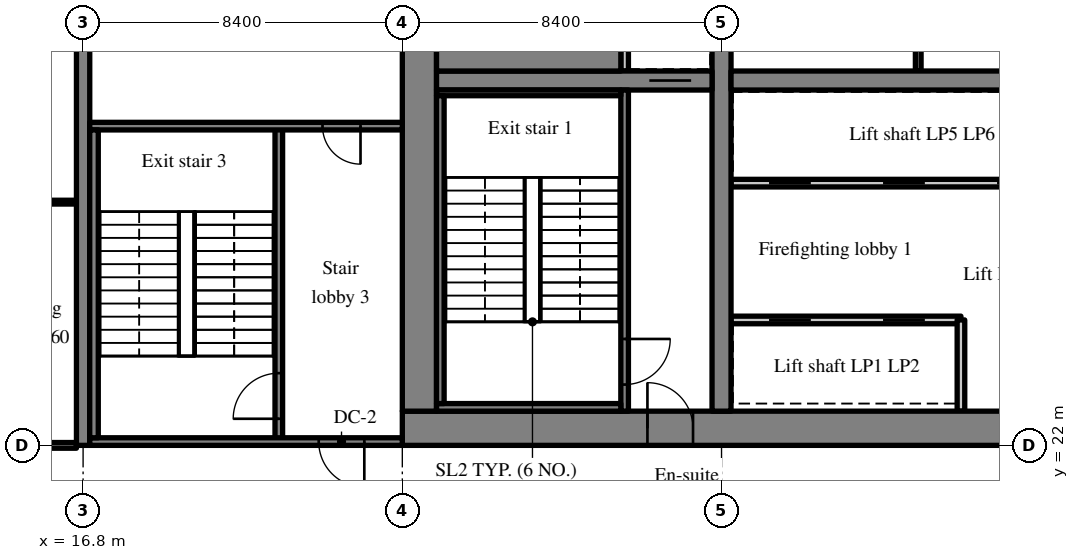
"""IFC4 building model, lengths in metres.
Left out: names, types, materials, properties, quantities, classifications, styles, units other than length and angle.
Written with IfcOpenShell. Run it as: python <this file> out.ifc"""

import sys

from ifc_helpers import new_model, si_unit, direction, frame, frame_2d, origin, place, context, subcontext, project, spatial, rectangle, extrude, source, transform, mapped, element, fill, save


model = new_model("IFC4")
c1 = context("Model", 3, precision=1e-05, world=origin(), true_north=direction((0.0, 1.0)))
c2 = subcontext(c1, "Body", "Model", "MODEL_VIEW")
j1 = project(units=[si_unit("LENGTHUNIT", "METRE"), si_unit("PLANEANGLEUNIT", "RADIAN")], contexts=[c1])
p1 = place(None, origin())
s1 = spatial("IfcSite", under=j1, at=p1, CompositionType="ELEMENT")
p2 = place(p1, origin())
s2 = spatial("IfcBuilding", under=s1, at=p2, CompositionType="ELEMENT")
p3 = place(p2, frame((0.0, 0.0, 137.0)))
s3 = spatial("IfcBuildingStorey", under=s2, at=p3, CompositionType="ELEMENT", Elevation=137.0)
m1 = source(origin(), c2, "Body", "SweptSolid", [
    extrude(rectangle(XDim=50.4, YDim=0.9, at=frame_2d((25.2, 0.0))), origin(), (0.0, 0.0, 1.0), 3.52),
])
p4 = place(p3, frame((25.2, 22.45, 0.0), z_axis=(0.0, 0.0, 1.0), x_axis=(1.0, 0.0, 0.0)))
e1 = element("IfcWall", 1, at=p4, inside=s3, PredefinedType="SHEAR", context=c2, shape_type="MappedRepresentation", body=[
    mapped(m1, transform((0.0, 0.0, 0.0), scale=1.0)),
])
m2 = source(origin(), c2, "Body", "SweptSolid", [
    extrude(rectangle(XDim=1.8, YDim=2.1, at=frame_2d((0.9, 1.05))), frame((0.0, 0.46, 0.0), z_axis=(0.0, -1.0, 0.0), x_axis=(1.0, 0.0, 0.0)), (0.0, 0.0, 1.0), 0.92),
])
p5 = place(p4, frame((15.9, 0.0, 0.0)))
e2 = element("IfcOpeningElement", 2, at=p5, cuts=e1, PredefinedType="OPENING", context=c2, shape_type="MappedRepresentation", body=[
    mapped(m2, transform((0.0, 0.0, 0.0), scale=1.0)),
])
m3 = source(origin(), c2, "Body", "SweptSolid", [
    extrude(rectangle(XDim=1.2, YDim=2.1, at=frame_2d((0.6, 1.05))), frame((0.0, 0.46, 0.0), z_axis=(0.0, -1.0, 0.0), x_axis=(1.0, 0.0, 0.0)), (0.0, 0.0, 1.0), 0.92),
])
p6 = place(p4, frame((26.975, 0.0, 0.0)))
e3 = element("IfcOpeningElement", 3, at=p6, cuts=e1, PredefinedType="OPENING", context=c2, shape_type="MappedRepresentation", body=[
    mapped(m3, transform((0.0, 0.0, 0.0), scale=1.0)),
])
m4 = source(origin(), c2, "Body", "SweptSolid", [
    extrude(rectangle(XDim=0.9, YDim=2.1, at=frame_2d((0.45, 1.05))), frame((0.0, 0.46, 0.0), z_axis=(0.0, -1.0, 0.0), x_axis=(1.0, 0.0, 0.0)), (0.0, 0.0, 1.0), 0.92),
])
p7 = place(p4, frame((34.5, 0.0, 0.0)))
e4 = element("IfcOpeningElement", 4, at=p7, cuts=e1, PredefinedType="OPENING", context=c2, shape_type="MappedRepresentation", body=[
    mapped(m4, transform((0.0, 0.0, 0.0), scale=1.0)),
])
p8 = place(p4, frame((31.5, 0.0, 0.0)))
e5 = element("IfcOpeningElement", 5, at=p8, cuts=e1, PredefinedType="OPENING", context=c2, shape_type="MappedRepresentation", body=[
    mapped(m4, transform((0.0, 0.0, 0.0), scale=1.0)),
])
p9 = place(p4, frame((39.788, 0.0, 0.0)))
e6 = element("IfcOpeningElement", 6, at=p9, cuts=e1, PredefinedType="OPENING", context=c2, shape_type="MappedRepresentation", body=[
    mapped(m4, transform((0.0, 0.0, 0.0), scale=1.0)),
])
p10 = place(p4, frame((36.762, 0.0, 0.0)))
e7 = element("IfcOpeningElement", 7, at=p10, cuts=e1, PredefinedType="OPENING", context=c2, shape_type="MappedRepresentation", body=[
    mapped(m4, transform((0.0, 0.0, 0.0), scale=1.0)),
])
p11 = place(p4, frame((6.45, 0.0, 0.0)))
e8 = element("IfcOpeningElement", 8, at=p11, cuts=e1, PredefinedType="OPENING", context=c2, shape_type="MappedRepresentation", body=[
    mapped(m3, transform((0.0, 0.0, 0.0), scale=1.0)),
])
p12 = place(p4, frame((47.775, 0.0, 0.0)))
e9 = element("IfcOpeningElement", 9, at=p12, cuts=e1, PredefinedType="OPENING", context=c2, shape_type="MappedRepresentation", body=[
    mapped(m3, transform((0.0, 0.0, 0.0), scale=1.0)),
])
m5 = source(origin(), c2, "Body", "SweptSolid", [
    extrude(rectangle(XDim=18.2, YDim=0.9, at=frame_2d((9.1, 0.0))), origin(), (0.0, 0.0, 1.0), 3.52),
])
p13 = place(p3, frame((25.65, 22.9, 0.0), z_axis=(0.0, 0.0, 1.0), x_axis=(0.0, 1.0, 0.0)))
e10 = element("IfcWall", 10, at=p13, inside=s3, PredefinedType="SHEAR", context=c2, shape_type="MappedRepresentation", body=[
    mapped(m5, transform((0.0, 0.0, 0.0), scale=1.0)),
])
m6 = source(origin(), c2, "Body", "SweptSolid", [
    extrude(rectangle(XDim=18.2, YDim=0.5, at=frame_2d((9.1, 0.0))), origin(), (0.0, 0.0, 1.0), 3.52),
])
p14 = place(p3, frame((33.6, 22.9, 0.0), z_axis=(0.0, 0.0, 1.0), x_axis=(0.0, 1.0, 0.0)))
e11 = element("IfcWall", 11, at=p14, inside=s3, PredefinedType="SHEAR", context=c2, shape_type="MappedRepresentation", body=[
    mapped(m6, transform((0.0, 0.0, 0.0), scale=1.0)),
])
m7 = source(origin(), c2, "Body", "SweptSolid", [
    extrude(rectangle(XDim=1.1, YDim=2.1, at=frame_2d((0.55, 1.05))), frame((0.0, 0.26, 0.0), z_axis=(0.0, -1.0, 0.0), x_axis=(1.0, 0.0, 0.0)), (0.0, 0.0, 1.0), 0.52),
])
p15 = place(p14, frame((12.55, 0.0, 0.0)))
e12 = element("IfcOpeningElement", 12, at=p15, cuts=e11, PredefinedType="OPENING", context=c2, shape_type="MappedRepresentation", body=[
    mapped(m7, transform((0.0, 0.0, 0.0), scale=1.0)),
])
m8 = source(origin(), c2, "Body", "SweptSolid", [
    extrude(rectangle(XDim=7.25, YDim=0.5, at=frame_2d((3.625, 0.0))), origin(), (0.0, 0.0, 1.0), 3.52),
])
p16 = place(p3, frame((26.1, 31.6, 0.0), z_axis=(0.0, 0.0, 1.0), x_axis=(1.0, 0.0, 0.0)))
e13 = element("IfcWall", 13, at=p16, inside=s3, PredefinedType="SHEAR", context=c2, shape_type="MappedRepresentation", body=[
    mapped(m8, transform((0.0, 0.0, 0.0), scale=1.0)),
])
p17 = place(p16, frame((5.6, 0.0, 0.0)))
e14 = element("IfcOpeningElement", 14, at=p17, cuts=e13, PredefinedType="OPENING", context=c2, shape_type="MappedRepresentation", body=[
    mapped(m7, transform((0.0, 0.0, 0.0), scale=1.0)),
])
m9 = source(origin(), c2, "Body", "SweptSolid", [
    extrude(rectangle(XDim=16.3, YDim=0.5, at=frame_2d((8.15, 0.0))), origin(), (0.0, 0.0, 1.0), 3.52),
])
p18 = place(p3, frame((33.85, 31.6, 0.0), z_axis=(0.0, 0.0, 1.0), x_axis=(1.0, 0.0, 0.0)))
e15 = element("IfcWall", 15, at=p18, inside=s3, PredefinedType="SHEAR", context=c2, shape_type="MappedRepresentation", body=[
    mapped(m9, transform((0.0, 0.0, 0.0), scale=1.0)),
])
m10 = source(origin(), c2, "Body", "SweptSolid", [
    extrude(rectangle(XDim=1.0, YDim=2.1, at=frame_2d((0.5, 1.05))), frame((0.0, 0.26, 0.0), z_axis=(0.0, -1.0, 0.0), x_axis=(1.0, 0.0, 0.0)), (0.0, 0.0, 1.0), 0.52),
])
p19 = place(p18, frame((14.725, 0.0, 0.0)))
e16 = element("IfcOpeningElement", 16, at=p19, cuts=e15, PredefinedType="OPENING", context=c2, shape_type="MappedRepresentation", body=[
    mapped(m10, transform((0.0, 0.0, 0.0), scale=1.0)),
])
m11 = source(origin(), c2, "Body", "SweptSolid", [
    extrude(rectangle(XDim=20.0, YDim=0.35, at=frame_2d((10.0, 0.0))), origin(), (0.0, 0.0, 1.0), 3.52),
])
p20 = place(p3, frame((16.8, 22.0, 0.0), z_axis=(0.0, 0.0, 1.0), x_axis=(0.0, 1.0, 0.0)))
e17 = element("IfcWall", 17, at=p20, inside=s3, PredefinedType="SHEAR", context=c2, shape_type="MappedRepresentation", body=[
    mapped(m11, transform((0.0, 0.0, 0.0), scale=1.0)),
])
m12 = source(origin(), c2, "Body", "SweptSolid", [
    extrude(rectangle(XDim=6.05, YDim=0.2, at=frame_2d((3.025, 0.0))), origin(), (0.0, 0.0, 1.0), 3.52),
])
p21 = place(p3, frame((33.85, 25.3, 0.0), z_axis=(0.0, 0.0, 1.0), x_axis=(1.0, 0.0, 0.0)))
e18 = element("IfcWall", 18, at=p21, inside=s3, PredefinedType="SOLIDWALL", context=c2, shape_type="MappedRepresentation", body=[
    mapped(m12, transform((0.0, 0.0, 0.0), scale=1.0)),
])
m13 = source(origin(), c2, "Body", "SweptSolid", [
    extrude(rectangle(XDim=1.1, YDim=2.1, at=frame_2d((0.55, 1.05))), frame((0.0, 0.11, 0.0), z_axis=(0.0, -1.0, 0.0), x_axis=(1.0, 0.0, 0.0)), (0.0, 0.0, 1.0), 0.22),
])
p22 = place(p21, frame((1.0, 0.0, 0.0)))
e19 = element("IfcOpeningElement", 19, at=p22, cuts=e18, PredefinedType="OPENING", context=c2, shape_type="MappedRepresentation", body=[
    mapped(m13, transform((0.0, 0.0, 0.0), scale=1.0)),
])
p23 = place(p21, frame((4.0, 0.0, 0.0)))
e20 = element("IfcOpeningElement", 20, at=p23, cuts=e18, PredefinedType="OPENING", context=c2, shape_type="MappedRepresentation", body=[
    mapped(m13, transform((0.0, 0.0, 0.0), scale=1.0)),
])
m14 = source(origin(), c2, "Body", "SweptSolid", [
    extrude(rectangle(XDim=12.05, YDim=0.2, at=frame_2d((6.025, 0.0))), origin(), (0.0, 0.0, 1.0), 3.52),
])
p24 = place(p3, frame((33.85, 28.9, 0.0), z_axis=(0.0, 0.0, 1.0), x_axis=(1.0, 0.0, 0.0)))
e21 = element("IfcWall", 21, at=p24, inside=s3, PredefinedType="SOLIDWALL", context=c2, shape_type="MappedRepresentation", body=[
    mapped(m14, transform((0.0, 0.0, 0.0), scale=1.0)),
])
p25 = place(p24, frame((1.0, 0.0, 0.0)))
e22 = element("IfcOpeningElement", 22, at=p25, cuts=e21, PredefinedType="OPENING", context=c2, shape_type="MappedRepresentation", body=[
    mapped(m13, transform((0.0, 0.0, 0.0), scale=1.0)),
])
p26 = place(p24, frame((4.0, 0.0, 0.0)))
e23 = element("IfcOpeningElement", 23, at=p26, cuts=e21, PredefinedType="OPENING", context=c2, shape_type="MappedRepresentation", body=[
    mapped(m13, transform((0.0, 0.0, 0.0), scale=1.0)),
])
p27 = place(p24, frame((7.0, 0.0, 0.0)))
e24 = element("IfcOpeningElement", 24, at=p27, cuts=e21, PredefinedType="OPENING", context=c2, shape_type="MappedRepresentation", body=[
    mapped(m13, transform((0.0, 0.0, 0.0), scale=1.0)),
])
p28 = place(p24, frame((10.0, 0.0, 0.0)))
e25 = element("IfcOpeningElement", 25, at=p28, cuts=e21, PredefinedType="OPENING", context=c2, shape_type="MappedRepresentation", body=[
    mapped(m13, transform((0.0, 0.0, 0.0), scale=1.0)),
])
m15 = source(origin(), c2, "Body", "SweptSolid", [
    extrude(rectangle(XDim=2.4, YDim=0.2, at=frame_2d((1.2, 0.0))), origin(), (0.0, 0.0, 1.0), 3.52),
])
p29 = place(p3, frame((39.9, 22.9, 0.0), z_axis=(0.0, 0.0, 1.0), x_axis=(0.0, 1.0, 0.0)))
e26 = element("IfcWall", 26, at=p29, inside=s3, PredefinedType="SOLIDWALL", context=c2, shape_type="MappedRepresentation", body=[
    mapped(m15, transform((0.0, 0.0, 0.0), scale=1.0)),
])
m16 = source(origin(), c2, "Body", "SweptSolid", [
    extrude(rectangle(XDim=3.15, YDim=0.15, at=frame_2d((1.575, 0.0))), origin(), (0.0, 0.0, 1.0), 3.52),
])
p30 = place(p3, frame((38.776, 31.85, 0.0), z_axis=(0.0, 0.0, 1.0), x_axis=(0.0, 1.0, 0.0)))
e27 = element("IfcWall", 27, at=p30, inside=s3, PredefinedType="PARTITIONING", context=c2, shape_type="MappedRepresentation", body=[
    mapped(m16, transform((0.0, 0.0, 0.0), scale=1.0)),
])
m17 = source(origin(), c2, "Body", "SweptSolid", [
    extrude(rectangle(XDim=8.45, YDim=0.2, at=frame_2d((4.225, 0.0))), origin(), (0.0, 0.0, 1.0), 3.52),
])
p31 = place(p3, frame((31.05, 22.9, 0.0), z_axis=(0.0, 0.0, 1.0), x_axis=(0.0, 1.0, 0.0)))
e28 = element("IfcWall", 28, at=p31, inside=s3, PredefinedType="SOLIDWALL", context=c2, shape_type="MappedRepresentation", body=[
    mapped(m17, transform((0.0, 0.0, 0.0), scale=1.0)),
])
m18 = source(origin(), c2, "Body", "SweptSolid", [
    extrude(rectangle(XDim=1.2, YDim=2.1, at=frame_2d((0.6, 1.05))), frame((0.0, 0.11, 0.0), z_axis=(0.0, -1.0, 0.0), x_axis=(1.0, 0.0, 0.0)), (0.0, 0.0, 1.0), 0.22),
])
p32 = place(p31, frame((0.7, 0.0, 0.0)))
e29 = element("IfcOpeningElement", 29, at=p32, cuts=e28, PredefinedType="OPENING", context=c2, shape_type="MappedRepresentation", body=[
    mapped(m18, transform((0.0, 0.0, 0.0), scale=1.0)),
])
m19 = source(origin(), c2, "Body", "SweptSolid", [
    extrude(rectangle(XDim=1.75, YDim=0.2, at=frame_2d((0.875, 0.0))), origin(), (0.0, 0.0, 1.0), 3.52),
])
p33 = place(p3, frame((31.05, 31.85, 0.0), z_axis=(0.0, 0.0, 1.0), x_axis=(0.0, 1.0, 0.0)))
e30 = element("IfcWall", 30, at=p33, inside=s3, PredefinedType="SOLIDWALL", context=c2, shape_type="MappedRepresentation", body=[
    mapped(m19, transform((0.0, 0.0, 0.0), scale=1.0)),
])
m20 = source(origin(), c2, "Body", "SweptSolid", [
    extrude(rectangle(XDim=8.3, YDim=0.2, at=frame_2d((4.15, 0.0))), origin(), (0.0, 0.0, 1.0), 3.52),
])
p34 = place(p3, frame((21.95, 22.1, 0.0), z_axis=(0.0, 0.0, 1.0), x_axis=(0.0, 1.0, 0.0)))
e31 = element("IfcWall", 31, at=p34, inside=s3, PredefinedType="SOLIDWALL", context=c2, shape_type="MappedRepresentation", body=[
    mapped(m20, transform((0.0, 0.0, 0.0), scale=1.0)),
])
p35 = place(p34, frame((0.6, 0.0, 0.0)))
e32 = element("IfcOpeningElement", 32, at=p35, cuts=e31, PredefinedType="OPENING", context=c2, shape_type="MappedRepresentation", body=[
    mapped(m18, transform((0.0, 0.0, 0.0), scale=1.0)),
])
m21 = source(origin(), c2, "Body", "SweptSolid", [
    extrude(rectangle(XDim=8.225, YDim=0.2, at=frame_2d((4.112, 0.0))), origin(), (0.0, 0.0, 1.0), 3.52),
])
p36 = place(p3, frame((16.975, 22.1, 0.0), z_axis=(0.0, 0.0, 1.0), x_axis=(1.0, 0.0, 0.0)))
e33 = element("IfcWall", 33, at=p36, inside=s3, PredefinedType="SOLIDWALL", context=c2, shape_type="MappedRepresentation", body=[
    mapped(m21, transform((0.0, 0.0, 0.0), scale=1.0)),
])
p37 = place(p36, frame((6.025, 0.0, 0.0)))
e34 = element("IfcOpeningElement", 34, at=p37, cuts=e33, PredefinedType="OPENING", context=c2, shape_type="MappedRepresentation", body=[
    mapped(m18, transform((0.0, 0.0, 0.0), scale=1.0)),
])
p38 = place(p3, frame((16.975, 30.4, 0.0), z_axis=(0.0, 0.0, 1.0), x_axis=(1.0, 0.0, 0.0)))
e35 = element("IfcWall", 35, at=p38, inside=s3, PredefinedType="SOLIDWALL", context=c2, shape_type="MappedRepresentation", body=[
    mapped(m21, transform((0.0, 0.0, 0.0), scale=1.0)),
])
m22 = source(origin(), c2, "Body", "SweptSolid", [
    extrude(rectangle(XDim=1.0, YDim=2.1, at=frame_2d((0.5, 1.05))), frame((0.0, 0.11, 0.0), z_axis=(0.0, -1.0, 0.0), x_axis=(1.0, 0.0, 0.0)), (0.0, 0.0, 1.0), 0.22),
])
p39 = place(p38, frame((6.125, 0.0, 0.0)))
e36 = element("IfcOpeningElement", 36, at=p39, cuts=e35, PredefinedType="OPENING", context=c2, shape_type="MappedRepresentation", body=[
    mapped(m22, transform((0.0, 0.0, 0.0), scale=1.0)),
])
m23 = source(origin(), c2, "Body", "SweptSolid", [
    extrude(rectangle(XDim=4.85, YDim=0.2, at=frame_2d((2.425, 0.0))), origin(), (0.0, 0.0, 1.0), 3.52),
])
p40 = place(p3, frame((26.1, 23.0, 0.0), z_axis=(0.0, 0.0, 1.0), x_axis=(1.0, 0.0, 0.0)))
e37 = element("IfcWall", 37, at=p40, inside=s3, PredefinedType="SOLIDWALL", context=c2, shape_type="MappedRepresentation", body=[
    mapped(m23, transform((0.0, 0.0, 0.0), scale=1.0)),
])
m24 = source(origin(), c2, "Body", "SweptSolid", [
    extrude(rectangle(XDim=4.85, YDim=0.15, at=frame_2d((2.425, 0.0))), origin(), (0.0, 0.0, 1.0), 3.52),
])
p41 = place(p3, frame((26.1, 31.275, 0.0), z_axis=(0.0, 0.0, 1.0), x_axis=(1.0, 0.0, 0.0)))
e38 = element("IfcWall", 38, at=p41, inside=s3, PredefinedType="SOLIDWALL", context=c2, shape_type="MappedRepresentation", body=[
    mapped(m24, transform((0.0, 0.0, 0.0), scale=1.0)),
])
m25 = source(origin(), c2, "Body", "SweptSolid", [
    extrude(rectangle(XDim=8.1, YDim=0.2, at=frame_2d((4.05, 0.0))), origin(), (0.0, 0.0, 1.0), 3.52),
])
p42 = place(p3, frame((26.2, 23.1, 0.0), z_axis=(0.0, 0.0, 1.0), x_axis=(0.0, 1.0, 0.0)))
e39 = element("IfcWall", 39, at=p42, inside=s3, PredefinedType="SOLIDWALL", context=c2, shape_type="MappedRepresentation", body=[
    mapped(m25, transform((0.0, 0.0, 0.0), scale=1.0)),
])
m26 = source(origin(), c2, "Body", "SweptSolid", [
    extrude(rectangle(XDim=8.1, YDim=0.225, at=frame_2d((4.05, 0.0))), origin(), (0.0, 0.0, 1.0), 3.52),
])
p43 = place(p3, frame((17.087, 22.2, 0.0), z_axis=(0.0, 0.0, 1.0), x_axis=(0.0, 1.0, 0.0)))
e40 = element("IfcWall", 40, at=p43, inside=s3, PredefinedType="SOLIDWALL", context=c2, shape_type="MappedRepresentation", body=[
    mapped(m26, transform((0.0, 0.0, 0.0), scale=1.0)),
])
m27 = source(origin(), c2, "Body", "SweptSolid", [
    extrude(rectangle(XDim=4.85, YDim=0.95, at=frame_2d((2.425, 0.0))), origin(), (0.0, 0.0, 1.0), 3.52),
])
p44 = place(p3, frame((26.1, 32.325, 0.0), z_axis=(0.0, 0.0, 1.0), x_axis=(1.0, 0.0, 0.0)))
e41 = element("IfcWall", 41, at=p44, inside=s3, PredefinedType="SOLIDWALL", context=c2, shape_type="MappedRepresentation", body=[
    mapped(m27, transform((0.0, 0.0, 0.0), scale=1.0)),
])
m28 = source(origin(), c2, "Body", "SweptSolid", [
    extrude(rectangle(XDim=2.6, YDim=0.1, at=frame_2d((1.3, 0.0))), origin(), (0.0, 0.0, 1.0), 3.52),
])
p45 = place(p3, frame((14.025, 28.4, 0.0), z_axis=(0.0, 0.0, 1.0), x_axis=(1.0, 0.0, 0.0)))
e42 = element("IfcWall", 42, at=p45, inside=s3, PredefinedType="PARTITIONING", context=c2, shape_type="MappedRepresentation", body=[
    mapped(m28, transform((0.0, 0.0, 0.0), scale=1.0)),
])
m29 = source(origin(), c2, "Body", "SweptSolid", [
    extrude(rectangle(XDim=0.9, YDim=2.1, at=frame_2d((0.45, 1.05))), frame((0.0, 0.06, 0.0), z_axis=(0.0, -1.0, 0.0), x_axis=(1.0, 0.0, 0.0)), (0.0, 0.0, 1.0), 0.12),
])
p46 = place(p45, frame((0.85, 0.0, 0.0)))
e43 = element("IfcOpeningElement", 43, at=p46, cuts=e42, PredefinedType="OPENING", context=c2, shape_type="MappedRepresentation", body=[
    mapped(m29, transform((0.0, 0.0, 0.0), scale=1.0)),
])
m30 = source(origin(), c2, "Body", "SweptSolid", [
    extrude(rectangle(XDim=8.05, YDim=0.15, at=frame_2d((4.025, 0.0))), origin(), (0.0, 0.0, 1.0), 2.82),
])
p47 = place(p3, frame((8.575, 22.0, 0.0), z_axis=(0.0, 0.0, 1.0), x_axis=(1.0, 0.0, 0.0)))
e44 = element("IfcWall", 44, at=p47, inside=s3, PredefinedType="PARTITIONING", context=c2, shape_type="MappedRepresentation", body=[
    mapped(m30, transform((0.0, 0.0, 0.0), scale=1.0)),
])
m31 = source(origin(), c2, "Body", "SweptSolid", [
    extrude(rectangle(XDim=1.0, YDim=2.1, at=frame_2d((0.5, 1.05))), frame((0.0, 0.085, 0.0), z_axis=(0.0, -1.0, 0.0), x_axis=(1.0, 0.0, 0.0)), (0.0, 0.0, 1.0), 0.17),
])
p48 = place(p47, frame((0.4, 0.0, 0.0)))
e45 = element("IfcOpeningElement", 45, at=p48, cuts=e44, PredefinedType="OPENING", context=c2, shape_type="MappedRepresentation", body=[
    mapped(m31, transform((0.0, 0.0, 0.0), scale=1.0)),
])
m32 = source(origin(), c2, "Body", "SweptSolid", [
    extrude(rectangle(XDim=1.1, YDim=2.1, at=frame_2d((0.55, 1.05))), frame((0.0, 0.025, 0.0), z_axis=(0.0, -1.0, 0.0), x_axis=(1.0, 0.0, 0.0)), (0.0, 0.0, 1.0), 0.05),
])
p49 = place(p22, origin())
e46 = element("IfcDoor", 46, at=p49, inside=s3, OperationType="SLIDING_TO_LEFT", PredefinedType="DOOR", context=c2, shape_type="MappedRepresentation", body=[
    mapped(m32, transform((0.0, 0.0, 0.0), scale=1.0)),
])
fill(e19, e46)
p50 = place(p23, origin())
e47 = element("IfcDoor", 47, at=p50, inside=s3, OperationType="SLIDING_TO_RIGHT", PredefinedType="DOOR", context=c2, shape_type="MappedRepresentation", body=[
    mapped(m32, transform((0.0, 0.0, 0.0), scale=1.0)),
])
fill(e20, e47)
p51 = place(p25, origin())
e48 = element("IfcDoor", 48, at=p51, inside=s3, OperationType="SLIDING_TO_LEFT", PredefinedType="DOOR", context=c2, shape_type="MappedRepresentation", body=[
    mapped(m32, transform((0.0, 0.0, 0.0), scale=1.0)),
])
fill(e22, e48)
p52 = place(p26, origin())
e49 = element("IfcDoor", 49, at=p52, inside=s3, OperationType="SLIDING_TO_RIGHT", PredefinedType="DOOR", context=c2, shape_type="MappedRepresentation", body=[
    mapped(m32, transform((0.0, 0.0, 0.0), scale=1.0)),
])
fill(e23, e49)
p53 = place(p27, origin())
e50 = element("IfcDoor", 50, at=p53, inside=s3, OperationType="SLIDING_TO_LEFT", PredefinedType="DOOR", context=c2, shape_type="MappedRepresentation", body=[
    mapped(m32, transform((0.0, 0.0, 0.0), scale=1.0)),
])
fill(e24, e50)
m33 = source(origin(), c2, "Body", "SweptSolid", [
    extrude(rectangle(XDim=1.2, YDim=2.1, at=frame_2d((0.6, 1.05))), frame((0.0, 0.025, 0.0), z_axis=(0.0, -1.0, 0.0), x_axis=(1.0, 0.0, 0.0)), (0.0, 0.0, 1.0), 0.05),
])
p54 = place(p32, origin())
e51 = element("IfcDoor", 51, at=p54, inside=s3, OperationType="SINGLE_SWING_RIGHT", PredefinedType="DOOR", context=c2, shape_type="MappedRepresentation", body=[
    mapped(m33, transform((0.0, 0.0, 0.0), scale=1.0)),
])
fill(e29, e51)
m34 = source(origin(), c2, "Body", "SweptSolid", [
    extrude(rectangle(XDim=1.2, YDim=2.1, at=frame_2d((0.6, 1.05))), frame((0.0, 0.375, 0.0), z_axis=(0.0, -1.0, 0.0), x_axis=(1.0, 0.0, 0.0)), (0.0, 0.0, 1.0), 0.05),
])
p55 = place(p11, origin())
e52 = element("IfcDoor", 52, at=p55, inside=s3, OperationType="SINGLE_SWING_LEFT", PredefinedType="DOOR", context=c2, shape_type="MappedRepresentation", body=[
    mapped(m34, transform((0.0, 0.0, 0.0), scale=1.0)),
])
fill(e8, e52)
p56 = place(p17, origin())
e53 = element("IfcDoor", 53, at=p56, inside=s3, OperationType="SLIDING_TO_RIGHT", PredefinedType="DOOR", context=c2, shape_type="MappedRepresentation", body=[
    mapped(m32, transform((0.0, 0.0, 0.0), scale=1.0)),
])
fill(e14, e53)
p57 = place(p35, origin())
e54 = element("IfcDoor", 54, at=p57, inside=s3, OperationType="SINGLE_SWING_LEFT", PredefinedType="DOOR", context=c2, shape_type="MappedRepresentation", body=[
    mapped(m33, transform((0.0, 0.0, 0.0), scale=1.0)),
])
fill(e32, e54)
p58 = place(p37, origin())
e55 = element("IfcDoor", 55, at=p58, inside=s3, OperationType="SINGLE_SWING_RIGHT", PredefinedType="DOOR", context=c2, shape_type="MappedRepresentation", body=[
    mapped(m33, transform((0.0, 0.0, 0.0), scale=1.0)),
])
fill(e34, e55)
m35 = source(origin(), c2, "Body", "SweptSolid", [
    extrude(rectangle(XDim=1.0, YDim=2.1, at=frame_2d((0.5, 1.05))), frame((0.0, 0.025, 0.0), z_axis=(0.0, -1.0, 0.0), x_axis=(1.0, 0.0, 0.0)), (0.0, 0.0, 1.0), 0.05),
])
p59 = place(p39, origin())
e56 = element("IfcDoor", 56, at=p59, inside=s3, OperationType="SINGLE_SWING_RIGHT", PredefinedType="DOOR", context=c2, shape_type="MappedRepresentation", body=[
    mapped(m35, transform((0.0, 0.0, 0.0), scale=1.0)),
])
fill(e36, e56)
save(model, sys.argv[1])
